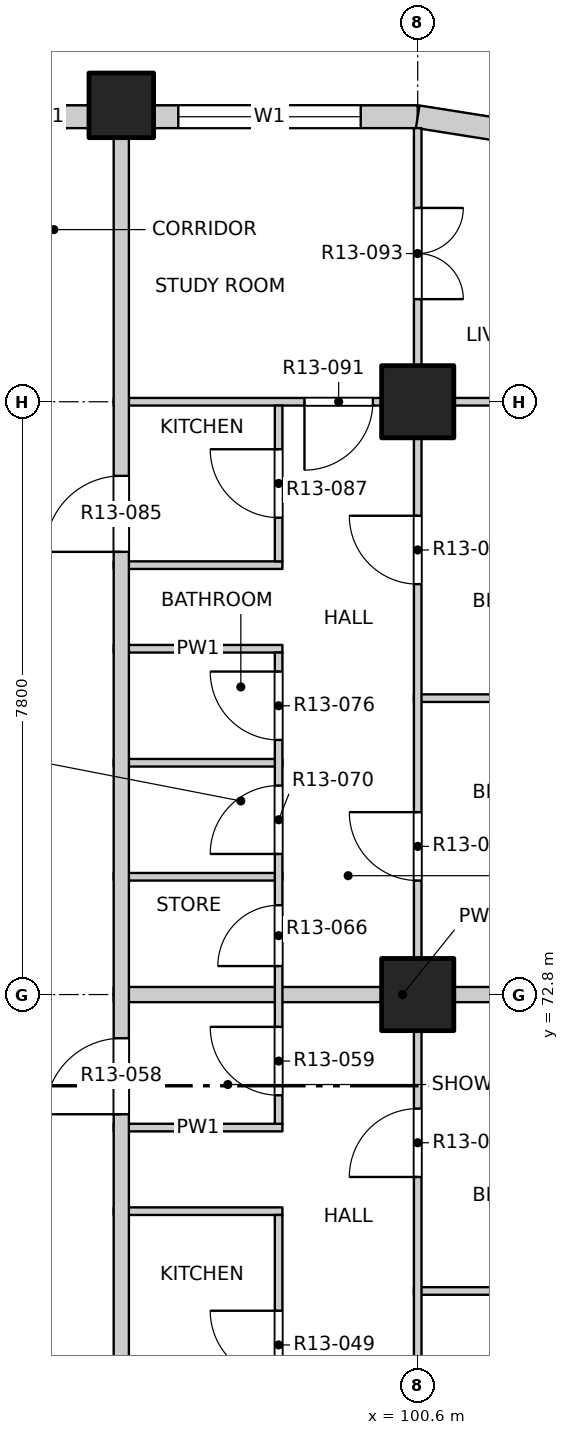
"""IFC4 building model, lengths in metres.
Left out: names, types, materials, properties, quantities, classifications, styles, units other than length and angle.
Written with IfcOpenShell. Run it as: python <this file> out.ifc"""

import sys

from ifc_helpers import new_model, si_unit, direction, frame, frame_2d, origin, origin_2d, place, context, subcontext, project, spatial, rectangle, extrude, element, fill, save


model = new_model("IFC4")
c1 = context("Model", 3, precision=1e-05, world=origin(), true_north=direction((0.0, 1.0)))
c2 = subcontext(c1, "Body", "Model", "MODEL_VIEW")
j1 = project(units=[si_unit("LENGTHUNIT", "METRE"), si_unit("PLANEANGLEUNIT", "RADIAN")], contexts=[c1])
p1 = place(None, origin())
s1 = spatial("IfcSite", under=j1, at=p1, CompositionType="ELEMENT")
p2 = place(p1, origin())
s2 = spatial("IfcBuilding", under=s1, at=p2, CompositionType="ELEMENT")
p3 = place(p2, frame((0.0, 0.0, 140.7)))
s3 = spatial("IfcBuildingStorey", under=s2, at=p3, CompositionType="ELEMENT", Elevation=140.7)
p4 = place(p3, frame((96.7, 84.5, -0.25), z_axis=(0.0, 0.0, 1.0), x_axis=(1.0, 0.0, 0.0)))
e1 = element("IfcColumn", 1, at=p4, inside=s3, PredefinedType="COLUMN", context=c2, shape_type="SweptSolid", body=[
    extrude(rectangle(XDim=0.85, YDim=0.85, at=origin_2d()), origin(), (0.0, 0.0, 1.0), 3.35),
])
for number, where, z_axis, x_axis in (
    (2, (100.6, 72.8, -0.25), (0.0, 0.0, 1.0), (1.0, 0.0, 0.0)),
    (3, (100.6, 80.6, -0.25), (0.0, 0.0, 1.0), (1.0, 0.0, 0.0)),
):
    element("IfcColumn", number, at=place(p3, frame(where, z_axis=z_axis, x_axis=x_axis)), inside=s3, PredefinedType="COLUMN", context=c2, shape_type="SweptSolid", body=[
        extrude(rectangle(XDim=0.95, YDim=0.95, at=origin_2d()), origin(), (0.0, 0.0, 1.0), 3.35),
    ])
p5 = place(p3, frame((95.025, 84.35, 0.0), z_axis=(0.0, 0.0, 1.0), x_axis=(1.0, 0.0, 0.0)))
e4 = element("IfcWall", 4, at=p5, inside=s3, PredefinedType="SOLIDWALL", context=c2, shape_type="SweptSolid", body=[
    extrude(rectangle(XDim=1.25, YDim=0.3, at=frame_2d((0.625, 0.0))), origin(), (0.0, 0.0, 1.0), 3.1),
])
p6 = place(p3, frame((97.125, 84.35, 0.0), z_axis=(0.0, 0.0, 1.0), x_axis=(1.0, 0.0, 0.0)))
e5 = element("IfcWall", 5, at=p6, inside=s3, PredefinedType="SOLIDWALL", context=c2, shape_type="SweptSolid", body=[
    extrude(rectangle(XDim=3.475, YDim=0.3, at=frame_2d((1.738, 0.0))), origin(), (0.0, 0.0, 1.0), 3.1),
])
p7 = place(p6, frame((0.325, 0.0, 0.9)))
e6 = element("IfcOpeningElement", 6, at=p7, cuts=e5, PredefinedType="OPENING", context=c2, shape_type="SweptSolid", body=[
    extrude(rectangle(XDim=2.4, YDim=1.8, at=frame_2d((1.2, 0.9))), frame((0.0, 0.16, 0.0), z_axis=(0.0, -1.0, 0.0), x_axis=(1.0, 0.0, 0.0)), (0.0, 0.0, 1.0), 0.32),
])
p8 = place(p3, frame((101.759, 84.167, 0.0), z_axis=(0.0, 0.0, 1.0), x_axis=(-0.987678452879, 0.156496880861, 0.0)))
e7 = element("IfcWall", 7, at=p8, inside=s3, PredefinedType="SOLIDWALL", context=c2, shape_type="SweptSolid", body=[
    extrude(rectangle(XDim=1.173, YDim=0.3, at=frame_2d((0.586, 0.0))), origin(), (0.0, 0.0, 1.0), 3.1),
])
p9 = place(p3, frame((100.55, 68.9, 0.0), z_axis=(0.0, 0.0, 1.0), x_axis=(1.0, 0.0, 0.0)))
e8 = element("IfcWall", 8, at=p9, inside=s3, PredefinedType="PARTITIONING", context=c2, shape_type="SweptSolid", body=[
    extrude(rectangle(XDim=3.65, YDim=0.1, at=frame_2d((1.825, 0.0))), origin(), (0.0, 0.0, 1.0), 3.1),
])
for number, where, z_axis, x_axis in (
    (9, (96.6, 69.95, 0.0), (0.0, 0.0, 1.0), (1.0, 0.0, 0.0)),
    (10, (96.6, 71.05, 0.0), (0.0, 0.0, 1.0), (1.0, 0.0, 0.0)),
):
    element("IfcWall", number, at=place(p3, frame(where, z_axis=z_axis, x_axis=x_axis)), inside=s3, PredefinedType="PARTITIONING", context=c2, shape_type="SweptSolid", body=[
        extrude(rectangle(XDim=2.22, YDim=0.1, at=frame_2d((1.11, 0.0))), origin(), (0.0, 0.0, 1.0), 3.1),
    ])
p10 = place(p3, frame((96.6, 72.8, 0.0), z_axis=(0.0, 0.0, 1.0), x_axis=(1.0, 0.0, 0.0)))
e11 = element("IfcWall", 11, at=p10, inside=s3, PredefinedType="PARTITIONING", context=c2, shape_type="SweptSolid", body=[
    extrude(rectangle(XDim=7.6, YDim=0.2, at=frame_2d((3.8, 0.0))), origin(), (0.0, 0.0, 1.0), 3.1),
])
for number, where, z_axis, x_axis in (
    (12, (96.6, 74.35, 0.0), (0.0, 0.0, 1.0), (1.0, 0.0, 0.0)),
    (13, (96.6, 75.85, 0.0), (0.0, 0.0, 1.0), (1.0, 0.0, 0.0)),
):
    element("IfcWall", number, at=place(p3, frame(where, z_axis=z_axis, x_axis=x_axis)), inside=s3, PredefinedType="PARTITIONING", context=c2, shape_type="SweptSolid", body=[
        extrude(rectangle(XDim=2.22, YDim=0.1, at=frame_2d((1.11, 0.0))), origin(), (0.0, 0.0, 1.0), 3.1),
    ])
p11 = place(p3, frame((100.55, 76.7, 0.0), z_axis=(0.0, 0.0, 1.0), x_axis=(1.0, 0.0, 0.0)))
e14 = element("IfcWall", 14, at=p11, inside=s3, PredefinedType="PARTITIONING", context=c2, shape_type="SweptSolid", body=[
    extrude(rectangle(XDim=3.65, YDim=0.1, at=frame_2d((1.825, 0.0))), origin(), (0.0, 0.0, 1.0), 3.1),
])
for number, where, z_axis, x_axis in (
    (15, (96.6, 77.35, 0.0), (0.0, 0.0, 1.0), (1.0, 0.0, 0.0)),
    (16, (96.6, 78.45, 0.0), (0.0, 0.0, 1.0), (1.0, 0.0, 0.0)),
):
    element("IfcWall", number, at=place(p3, frame(where, z_axis=z_axis, x_axis=x_axis)), inside=s3, PredefinedType="PARTITIONING", context=c2, shape_type="SweptSolid", body=[
        extrude(rectangle(XDim=2.22, YDim=0.1, at=frame_2d((1.11, 0.0))), origin(), (0.0, 0.0, 1.0), 3.1),
    ])
p12 = place(p3, frame((96.6, 80.6, 0.0), z_axis=(0.0, 0.0, 1.0), x_axis=(1.0, 0.0, 0.0)))
e17 = element("IfcWall", 17, at=p12, inside=s3, PredefinedType="PARTITIONING", context=c2, shape_type="SweptSolid", body=[
    extrude(rectangle(XDim=7.6, YDim=0.1, at=frame_2d((3.8, 0.0))), origin(), (0.0, 0.0, 1.0), 3.1),
])
p13 = place(p12, frame((2.51, 0.0, 0.0)))
e18 = element("IfcOpeningElement", 18, at=p13, cuts=e17, PredefinedType="OPENING", context=c2, shape_type="SweptSolid", body=[
    extrude(rectangle(XDim=0.9, YDim=2.1, at=frame_2d((0.45, 1.05))), frame((0.0, 0.06, 0.0), z_axis=(0.0, -1.0, 0.0), x_axis=(1.0, 0.0, 0.0)), (0.0, 0.0, 1.0), 0.12),
])
p14 = place(p3, frame((96.7, 49.5, 0.0), z_axis=(0.0, 0.0, 1.0), x_axis=(0.0, 1.0, 0.0)))
e19 = element("IfcWall", 19, at=p14, inside=s3, PredefinedType="PARTITIONING", context=c2, shape_type="SweptSolid", body=[
    extrude(rectangle(XDim=34.7, YDim=0.2, at=frame_2d((17.35, 0.0))), origin(), (0.0, 0.0, 1.0), 3.1),
])
p15 = place(p14, frame((3.675, 0.0, 0.0)))
e20 = element("IfcOpeningElement", 20, at=p15, cuts=e19, PredefinedType="OPENING", context=c2, shape_type="SweptSolid", body=[
    extrude(rectangle(XDim=1.0, YDim=2.1, at=frame_2d((0.5, 1.05))), frame((0.0, 0.11, 0.0), z_axis=(0.0, -1.0, 0.0), x_axis=(1.0, 0.0, 0.0)), (0.0, 0.0, 1.0), 0.22),
])
p16 = place(p14, frame((21.725, 0.0, 0.0)))
e21 = element("IfcOpeningElement", 21, at=p16, cuts=e19, PredefinedType="OPENING", context=c2, shape_type="SweptSolid", body=[
    extrude(rectangle(XDim=1.0, YDim=2.1, at=frame_2d((0.5, 1.05))), frame((0.0, 0.11, 0.0), z_axis=(0.0, -1.0, 0.0), x_axis=(1.0, 0.0, 0.0)), (0.0, 0.0, 1.0), 0.22),
])
p17 = place(p14, frame((29.125, 0.0, 0.0)))
e22 = element("IfcOpeningElement", 22, at=p17, cuts=e19, PredefinedType="OPENING", context=c2, shape_type="SweptSolid", body=[
    extrude(rectangle(XDim=1.0, YDim=2.1, at=frame_2d((0.5, 1.05))), frame((0.0, 0.11, 0.0), z_axis=(0.0, -1.0, 0.0), x_axis=(1.0, 0.0, 0.0)), (0.0, 0.0, 1.0), 0.22),
])
p18 = place(p3, frame((98.77, 55.5, 0.0), z_axis=(0.0, 0.0, 1.0), x_axis=(0.0, 1.0, 0.0)))
e23 = element("IfcWall", 23, at=p18, inside=s3, PredefinedType="PARTITIONING", context=c2, shape_type="SweptSolid", body=[
    extrude(rectangle(XDim=14.4, YDim=0.1, at=frame_2d((7.2, 0.0))), origin(), (0.0, 0.0, 1.0), 3.1),
])
p19 = place(p18, frame((0.4, 0.0, 0.0)))
e24 = element("IfcOpeningElement", 24, at=p19, cuts=e23, PredefinedType="OPENING", context=c2, shape_type="SweptSolid", body=[
    extrude(rectangle(XDim=0.9, YDim=2.1, at=frame_2d((0.45, 1.05))), frame((0.0, 0.06, 0.0), z_axis=(0.0, -1.0, 0.0), x_axis=(1.0, 0.0, 0.0)), (0.0, 0.0, 1.0), 0.12),
])
p20 = place(p18, frame((2.275, 0.0, 0.0)))
e25 = element("IfcOpeningElement", 25, at=p20, cuts=e23, PredefinedType="OPENING", context=c2, shape_type="SweptSolid", body=[
    extrude(rectangle(XDim=0.9, YDim=2.1, at=frame_2d((0.45, 1.05))), frame((0.0, 0.06, 0.0), z_axis=(0.0, -1.0, 0.0), x_axis=(1.0, 0.0, 0.0)), (0.0, 0.0, 1.0), 0.12),
])
p21 = place(p18, frame((4.25, 0.0, 0.0)))
e26 = element("IfcOpeningElement", 26, at=p21, cuts=e23, PredefinedType="OPENING", context=c2, shape_type="SweptSolid", body=[
    extrude(rectangle(XDim=0.8, YDim=2.1, at=frame_2d((0.4, 1.05))), frame((0.0, 0.06, 0.0), z_axis=(0.0, -1.0, 0.0), x_axis=(1.0, 0.0, 0.0)), (0.0, 0.0, 1.0), 0.12),
])
p22 = place(p18, frame((6.65, 0.0, 0.0)))
e27 = element("IfcOpeningElement", 27, at=p22, cuts=e23, PredefinedType="OPENING", context=c2, shape_type="SweptSolid", body=[
    extrude(rectangle(XDim=0.8, YDim=2.1, at=frame_2d((0.4, 1.05))), frame((0.0, 0.06, 0.0), z_axis=(0.0, -1.0, 0.0), x_axis=(1.0, 0.0, 0.0)), (0.0, 0.0, 1.0), 0.12),
])
p23 = place(p18, frame((9.265, 0.0, 0.0)))
e28 = element("IfcOpeningElement", 28, at=p23, cuts=e23, PredefinedType="OPENING", context=c2, shape_type="SweptSolid", body=[
    extrude(rectangle(XDim=0.9, YDim=2.1, at=frame_2d((0.45, 1.05))), frame((0.0, 0.06, 0.0), z_axis=(0.0, -1.0, 0.0), x_axis=(1.0, 0.0, 0.0)), (0.0, 0.0, 1.0), 0.12),
])
p24 = place(p18, frame((12.24, 0.0, 0.0)))
e29 = element("IfcOpeningElement", 29, at=p24, cuts=e23, PredefinedType="OPENING", context=c2, shape_type="SweptSolid", body=[
    extrude(rectangle(XDim=0.9, YDim=2.1, at=frame_2d((0.45, 1.05))), frame((0.0, 0.06, 0.0), z_axis=(0.0, -1.0, 0.0), x_axis=(1.0, 0.0, 0.0)), (0.0, 0.0, 1.0), 0.12),
])
p25 = place(p3, frame((98.77, 71.1, 0.0), z_axis=(0.0, 0.0, 1.0), x_axis=(0.0, 1.0, 0.0)))
e30 = element("IfcWall", 30, at=p25, inside=s3, PredefinedType="PARTITIONING", context=c2, shape_type="SweptSolid", body=[
    extrude(rectangle(XDim=6.2, YDim=0.1, at=frame_2d((3.1, 0.0))), origin(), (0.0, 0.0, 1.0), 3.1),
])
p26 = place(p25, frame((0.375, 0.0, 0.0)))
e31 = element("IfcOpeningElement", 31, at=p26, cuts=e30, PredefinedType="OPENING", context=c2, shape_type="SweptSolid", body=[
    extrude(rectangle(XDim=0.9, YDim=2.1, at=frame_2d((0.45, 1.05))), frame((0.0, 0.06, 0.0), z_axis=(0.0, -1.0, 0.0), x_axis=(1.0, 0.0, 0.0)), (0.0, 0.0, 1.0), 0.12),
])
p27 = place(p25, frame((2.075, 0.0, 0.0)))
e32 = element("IfcOpeningElement", 32, at=p27, cuts=e30, PredefinedType="OPENING", context=c2, shape_type="SweptSolid", body=[
    extrude(rectangle(XDim=0.8, YDim=2.1, at=frame_2d((0.4, 1.05))), frame((0.0, 0.06, 0.0), z_axis=(0.0, -1.0, 0.0), x_axis=(1.0, 0.0, 0.0)), (0.0, 0.0, 1.0), 0.12),
])
p28 = place(p25, frame((3.55, 0.0, 0.0)))
e33 = element("IfcOpeningElement", 33, at=p28, cuts=e30, PredefinedType="OPENING", context=c2, shape_type="SweptSolid", body=[
    extrude(rectangle(XDim=0.9, YDim=2.1, at=frame_2d((0.45, 1.05))), frame((0.0, 0.06, 0.0), z_axis=(0.0, -1.0, 0.0), x_axis=(1.0, 0.0, 0.0)), (0.0, 0.0, 1.0), 0.12),
])
p29 = place(p25, frame((5.05, 0.0, 0.0)))
e34 = element("IfcOpeningElement", 34, at=p29, cuts=e30, PredefinedType="OPENING", context=c2, shape_type="SweptSolid", body=[
    extrude(rectangle(XDim=0.9, YDim=2.1, at=frame_2d((0.45, 1.05))), frame((0.0, 0.06, 0.0), z_axis=(0.0, -1.0, 0.0), x_axis=(1.0, 0.0, 0.0)), (0.0, 0.0, 1.0), 0.12),
])
p30 = place(p3, frame((98.77, 78.5, 0.0), z_axis=(0.0, 0.0, 1.0), x_axis=(0.0, 1.0, 0.0)))
e35 = element("IfcWall", 35, at=p30, inside=s3, PredefinedType="PARTITIONING", context=c2, shape_type="SweptSolid", body=[
    extrude(rectangle(XDim=2.05, YDim=0.1, at=frame_2d((1.025, 0.0))), origin(), (0.0, 0.0, 1.0), 3.1),
])
p31 = place(p30, frame((0.575, 0.0, 0.0)))
e36 = element("IfcOpeningElement", 36, at=p31, cuts=e35, PredefinedType="OPENING", context=c2, shape_type="SweptSolid", body=[
    extrude(rectangle(XDim=0.9, YDim=2.1, at=frame_2d((0.45, 1.05))), frame((0.0, 0.06, 0.0), z_axis=(0.0, -1.0, 0.0), x_axis=(1.0, 0.0, 0.0)), (0.0, 0.0, 1.0), 0.12),
])
p32 = place(p3, frame((100.6, 45.8, 0.0), z_axis=(0.0, 0.0, 1.0), x_axis=(0.0, 1.0, 0.0)))
e37 = element("IfcWall", 37, at=p32, inside=s3, PredefinedType="PARTITIONING", context=c2, shape_type="SweptSolid", body=[
    extrude(rectangle(XDim=38.4, YDim=0.1, at=frame_2d((19.2, 0.0))), origin(), (0.0, 0.0, 1.0), 3.1),
])
p33 = place(p32, frame((1.05, 0.0, 0.0)))
e38 = element("IfcOpeningElement", 38, at=p33, cuts=e37, PredefinedType="OPENING", context=c2, shape_type="SweptSolid", body=[
    extrude(rectangle(XDim=1.2, YDim=2.1, at=frame_2d((0.6, 1.05))), frame((0.0, 0.06, 0.0), z_axis=(0.0, -1.0, 0.0), x_axis=(1.0, 0.0, 0.0)), (0.0, 0.0, 1.0), 0.12),
])
p34 = place(p32, frame((5.1, 0.0, 0.0)))
e39 = element("IfcOpeningElement", 39, at=p34, cuts=e37, PredefinedType="OPENING", context=c2, shape_type="SweptSolid", body=[
    extrude(rectangle(XDim=0.9, YDim=2.1, at=frame_2d((0.45, 1.05))), frame((0.0, 0.06, 0.0), z_axis=(0.0, -1.0, 0.0), x_axis=(1.0, 0.0, 0.0)), (0.0, 0.0, 1.0), 0.12),
])
p35 = place(p32, frame((9.0, 0.0, 0.0)))
e40 = element("IfcOpeningElement", 40, at=p35, cuts=e37, PredefinedType="OPENING", context=c2, shape_type="SweptSolid", body=[
    extrude(rectangle(XDim=0.9, YDim=2.1, at=frame_2d((0.45, 1.05))), frame((0.0, 0.06, 0.0), z_axis=(0.0, -1.0, 0.0), x_axis=(1.0, 0.0, 0.0)), (0.0, 0.0, 1.0), 0.12),
])
p36 = place(p32, frame((12.9, 0.0, 0.0)))
e41 = element("IfcOpeningElement", 41, at=p36, cuts=e37, PredefinedType="OPENING", context=c2, shape_type="SweptSolid", body=[
    extrude(rectangle(XDim=0.9, YDim=2.1, at=frame_2d((0.45, 1.05))), frame((0.0, 0.06, 0.0), z_axis=(0.0, -1.0, 0.0), x_axis=(1.0, 0.0, 0.0)), (0.0, 0.0, 1.0), 0.12),
])
p37 = place(p32, frame((16.8, 0.0, 0.0)))
e42 = element("IfcOpeningElement", 42, at=p37, cuts=e37, PredefinedType="OPENING", context=c2, shape_type="SweptSolid", body=[
    extrude(rectangle(XDim=0.9, YDim=2.1, at=frame_2d((0.45, 1.05))), frame((0.0, 0.06, 0.0), z_axis=(0.0, -1.0, 0.0), x_axis=(1.0, 0.0, 0.0)), (0.0, 0.0, 1.0), 0.12),
])
p38 = place(p32, frame((20.7, 0.0, 0.0)))
e43 = element("IfcOpeningElement", 43, at=p38, cuts=e37, PredefinedType="OPENING", context=c2, shape_type="SweptSolid", body=[
    extrude(rectangle(XDim=0.9, YDim=2.1, at=frame_2d((0.45, 1.05))), frame((0.0, 0.06, 0.0), z_axis=(0.0, -1.0, 0.0), x_axis=(1.0, 0.0, 0.0)), (0.0, 0.0, 1.0), 0.12),
])
p39 = place(p32, frame((24.6, 0.0, 0.0)))
e44 = element("IfcOpeningElement", 44, at=p39, cuts=e37, PredefinedType="OPENING", context=c2, shape_type="SweptSolid", body=[
    extrude(rectangle(XDim=0.9, YDim=2.1, at=frame_2d((0.45, 1.05))), frame((0.0, 0.06, 0.0), z_axis=(0.0, -1.0, 0.0), x_axis=(1.0, 0.0, 0.0)), (0.0, 0.0, 1.0), 0.12),
])
p40 = place(p32, frame((28.5, 0.0, 0.0)))
e45 = element("IfcOpeningElement", 45, at=p40, cuts=e37, PredefinedType="OPENING", context=c2, shape_type="SweptSolid", body=[
    extrude(rectangle(XDim=0.9, YDim=2.1, at=frame_2d((0.45, 1.05))), frame((0.0, 0.06, 0.0), z_axis=(0.0, -1.0, 0.0), x_axis=(1.0, 0.0, 0.0)), (0.0, 0.0, 1.0), 0.12),
])
p41 = place(p32, frame((32.4, 0.0, 0.0)))
e46 = element("IfcOpeningElement", 46, at=p41, cuts=e37, PredefinedType="OPENING", context=c2, shape_type="SweptSolid", body=[
    extrude(rectangle(XDim=0.9, YDim=2.1, at=frame_2d((0.45, 1.05))), frame((0.0, 0.06, 0.0), z_axis=(0.0, -1.0, 0.0), x_axis=(1.0, 0.0, 0.0)), (0.0, 0.0, 1.0), 0.12),
])
p42 = place(p32, frame((36.15, 0.0, 0.0)))
e47 = element("IfcOpeningElement", 47, at=p42, cuts=e37, PredefinedType="OPENING", context=c2, shape_type="SweptSolid", body=[
    extrude(rectangle(XDim=1.2, YDim=2.1, at=frame_2d((0.6, 1.05))), frame((0.0, 0.06, 0.0), z_axis=(0.0, -1.0, 0.0), x_axis=(1.0, 0.0, 0.0)), (0.0, 0.0, 1.0), 0.12),
])
p43 = place(p7, origin())
e48 = element("IfcWindow", 48, at=p43, inside=s3, PartitioningType="DOUBLE_PANEL_VERTICAL", PredefinedType="WINDOW", context=c2, shape_type="SweptSolid", body=[
    extrude(rectangle(XDim=2.4, YDim=1.8, at=frame_2d((1.2, 0.9))), frame((0.0, 0.03, 0.0), z_axis=(0.0, -1.0, 0.0), x_axis=(1.0, 0.0, 0.0)), (0.0, 0.0, 1.0), 0.06),
])
fill(e6, e48)
p44 = place(p24, origin())
e49 = element("IfcDoor", 49, at=p44, inside=s3, OperationType="SINGLE_SWING_RIGHT", PredefinedType="DOOR", context=c2, shape_type="SweptSolid", body=[
    extrude(rectangle(XDim=0.9, YDim=2.1, at=frame_2d((0.45, 1.05))), frame((0.0, 0.025, 0.0), z_axis=(0.0, -1.0, 0.0), x_axis=(1.0, 0.0, 0.0)), (0.0, 0.0, 1.0), 0.05),
])
fill(e29, e49)
p45 = place(p39, origin())
e50 = element("IfcDoor", 50, at=p45, inside=s3, OperationType="SINGLE_SWING_LEFT", PredefinedType="DOOR", context=c2, shape_type="SweptSolid", body=[
    extrude(rectangle(XDim=0.9, YDim=2.1, at=frame_2d((0.45, 1.05))), frame((0.0, 0.025, 0.0), z_axis=(0.0, -1.0, 0.0), x_axis=(1.0, 0.0, 0.0)), (0.0, 0.0, 1.0), 0.05),
])
fill(e44, e50)
p46 = place(p16, origin())
e51 = element("IfcDoor", 51, at=p46, inside=s3, OperationType="SINGLE_SWING_LEFT", PredefinedType="DOOR", context=c2, shape_type="SweptSolid", body=[
    extrude(rectangle(XDim=1.0, YDim=2.1, at=frame_2d((0.5, 1.05))), frame((0.0, 0.025, 0.0), z_axis=(0.0, -1.0, 0.0), x_axis=(1.0, 0.0, 0.0)), (0.0, 0.0, 1.0), 0.05),
])
fill(e21, e51)
p47 = place(p26, origin())
e52 = element("IfcDoor", 52, at=p47, inside=s3, OperationType="SINGLE_SWING_RIGHT", PredefinedType="DOOR", context=c2, shape_type="SweptSolid", body=[
    extrude(rectangle(XDim=0.9, YDim=2.1, at=frame_2d((0.45, 1.05))), frame((0.0, 0.025, 0.0), z_axis=(0.0, -1.0, 0.0), x_axis=(1.0, 0.0, 0.0)), (0.0, 0.0, 1.0), 0.05),
])
fill(e31, e52)
p48 = place(p27, origin())
e53 = element("IfcDoor", 53, at=p48, inside=s3, OperationType="SINGLE_SWING_LEFT", PredefinedType="DOOR", context=c2, shape_type="SweptSolid", body=[
    extrude(rectangle(XDim=0.8, YDim=2.1, at=frame_2d((0.4, 1.05))), frame((0.0, 0.025, 0.0), z_axis=(0.0, -1.0, 0.0), x_axis=(1.0, 0.0, 0.0)), (0.0, 0.0, 1.0), 0.05),
])
fill(e32, e53)
p49 = place(p40, origin())
e54 = element("IfcDoor", 54, at=p49, inside=s3, OperationType="SINGLE_SWING_RIGHT", PredefinedType="DOOR", context=c2, shape_type="SweptSolid", body=[
    extrude(rectangle(XDim=0.9, YDim=2.1, at=frame_2d((0.45, 1.05))), frame((0.0, 0.025, 0.0), z_axis=(0.0, -1.0, 0.0), x_axis=(1.0, 0.0, 0.0)), (0.0, 0.0, 1.0), 0.05),
])
fill(e45, e54)
p50 = place(p28, origin())
e55 = element("IfcDoor", 55, at=p50, inside=s3, OperationType="SINGLE_SWING_LEFT", PredefinedType="DOOR", context=c2, shape_type="SweptSolid", body=[
    extrude(rectangle(XDim=0.9, YDim=2.1, at=frame_2d((0.45, 1.05))), frame((0.0, 0.025, 0.0), z_axis=(0.0, -1.0, 0.0), x_axis=(1.0, 0.0, 0.0)), (0.0, 0.0, 1.0), 0.05),
])
fill(e33, e55)
p51 = place(p29, origin())
e56 = element("IfcDoor", 56, at=p51, inside=s3, OperationType="SINGLE_SWING_RIGHT", PredefinedType="DOOR", context=c2, shape_type="SweptSolid", body=[
    extrude(rectangle(XDim=0.9, YDim=2.1, at=frame_2d((0.45, 1.05))), frame((0.0, 0.025, 0.0), z_axis=(0.0, -1.0, 0.0), x_axis=(1.0, 0.0, 0.0)), (0.0, 0.0, 1.0), 0.05),
])
fill(e34, e56)
p52 = place(p41, origin())
e57 = element("IfcDoor", 57, at=p52, inside=s3, OperationType="SINGLE_SWING_RIGHT", PredefinedType="DOOR", context=c2, shape_type="SweptSolid", body=[
    extrude(rectangle(XDim=0.9, YDim=2.1, at=frame_2d((0.45, 1.05))), frame((0.0, 0.025, 0.0), z_axis=(0.0, -1.0, 0.0), x_axis=(1.0, 0.0, 0.0)), (0.0, 0.0, 1.0), 0.05),
])
fill(e46, e57)
p53 = place(p17, origin())
e58 = element("IfcDoor", 58, at=p53, inside=s3, OperationType="SINGLE_SWING_LEFT", PredefinedType="DOOR", context=c2, shape_type="SweptSolid", body=[
    extrude(rectangle(XDim=1.0, YDim=2.1, at=frame_2d((0.5, 1.05))), frame((0.0, 0.025, 0.0), z_axis=(0.0, -1.0, 0.0), x_axis=(1.0, 0.0, 0.0)), (0.0, 0.0, 1.0), 0.05),
])
fill(e22, e58)
p54 = place(p31, origin())
e59 = element("IfcDoor", 59, at=p54, inside=s3, OperationType="SINGLE_SWING_RIGHT", PredefinedType="DOOR", context=c2, shape_type="SweptSolid", body=[
    extrude(rectangle(XDim=0.9, YDim=2.1, at=frame_2d((0.45, 1.05))), frame((0.0, 0.025, 0.0), z_axis=(0.0, -1.0, 0.0), x_axis=(1.0, 0.0, 0.0)), (0.0, 0.0, 1.0), 0.05),
])
fill(e36, e59)
p55 = place(p13, origin())
e60 = element("IfcDoor", 60, at=p55, inside=s3, OperationType="SINGLE_SWING_RIGHT", PredefinedType="DOOR", context=c2, shape_type="SweptSolid", body=[
    extrude(rectangle(XDim=0.9, YDim=2.1, at=frame_2d((0.45, 1.05))), frame((0.0, 0.025, 0.0), z_axis=(0.0, -1.0, 0.0), x_axis=(1.0, 0.0, 0.0)), (0.0, 0.0, 1.0), 0.05),
])
fill(e18, e60)
p56 = place(p42, origin())
e61 = element("IfcDoor", 61, at=p56, inside=s3, OperationType="DOUBLE_DOOR_SINGLE_SWING", PredefinedType="DOOR", context=c2, shape_type="SweptSolid", body=[
    extrude(rectangle(XDim=1.2, YDim=2.1, at=frame_2d((0.6, 1.05))), frame((0.0, 0.025, 0.0), z_axis=(0.0, -1.0, 0.0), x_axis=(1.0, 0.0, 0.0)), (0.0, 0.0, 1.0), 0.05),
])
fill(e47, e61)
save(model, sys.argv[1])
